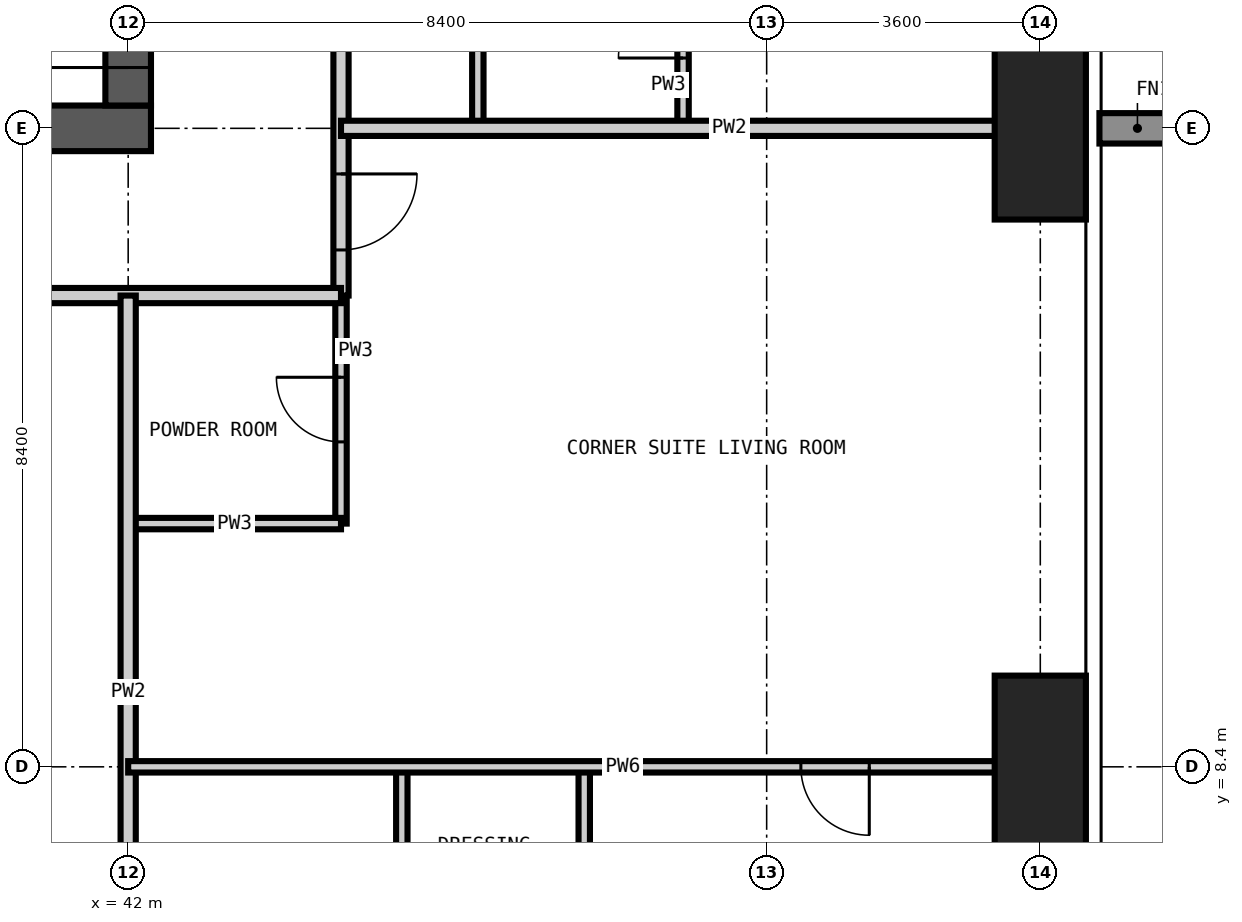
"""IFC4 building model, lengths in metres.
Left out: names, types, materials, properties, quantities, classifications, styles, units other than length and angle.
Written with IfcOpenShell. Run it as: python <this file> out.ifc"""

import sys

from ifc_helpers import new_model, si_unit, direction, frame, frame_2d, origin, origin_2d, place, context, subcontext, project, spatial, rectangle, extrude, element, fill, save


model = new_model("IFC4")
c1 = context("Model", 3, precision=1e-05, world=origin(), true_north=direction((0.0, 1.0)))
c2 = subcontext(c1, "Body", "Model", "MODEL_VIEW")
j1 = project(units=[si_unit("LENGTHUNIT", "METRE"), si_unit("PLANEANGLEUNIT", "RADIAN")], contexts=[c1])
p1 = place(None, origin())
s1 = spatial("IfcSite", under=j1, at=p1, CompositionType="ELEMENT")
p2 = place(p1, origin())
s2 = spatial("IfcBuilding", under=s1, at=p2, CompositionType="ELEMENT")
p3 = place(p2, frame((0.0, 0.0, 205.8)))
s3 = spatial("IfcBuildingStorey", under=s2, at=p3, CompositionType="ELEMENT", Elevation=205.8)
for number, where, z_axis, x_axis in (
    (1, (54.0, 8.4, -0.35), (0.0, 0.0, 1.0), (1.0, 0.0, 0.0)),
    (2, (54.0, 16.8, -0.35), (0.0, 0.0, 1.0), (1.0, 0.0, 0.0)),
):
    element("IfcColumn", number, at=place(p3, frame(where, z_axis=z_axis, x_axis=x_axis)), inside=s3, PredefinedType="COLUMN", context=c2, shape_type="SweptSolid", body=[
        extrude(rectangle(XDim=1.2, YDim=2.4, at=origin_2d()), origin(), (0.0, 0.0, 1.0), 3.6),
    ])
p4 = place(p3, frame((16.5, 16.8, -0.35), z_axis=(0.0, 0.0, 1.0), x_axis=(1.0, 0.0, 0.0)))
e3 = element("IfcWall", 3, at=p4, inside=s3, PredefinedType="SHEAR", context=c2, shape_type="SweptSolid", body=[
    extrude(rectangle(XDim=25.8, YDim=0.6, at=frame_2d((12.9, 0.0))), origin(), (0.0, 0.0, 1.0), 3.6),
])
p5 = place(p4, frame((12.4, 0.0, 0.35)))
e4 = element("IfcOpeningElement", 4, at=p5, cuts=e3, PredefinedType="OPENING", context=c2, shape_type="SweptSolid", body=[
    extrude(rectangle(XDim=1.0, YDim=2.1, at=frame_2d((0.5, 1.05))), frame((0.0, 0.31, 0.0), z_axis=(0.0, -1.0, 0.0), x_axis=(1.0, 0.0, 0.0)), (0.0, 0.0, 1.0), 0.62),
])
p6 = place(p4, frame((18.7, 0.0, 0.35)))
e5 = element("IfcOpeningElement", 5, at=p6, cuts=e3, PredefinedType="OPENING", context=c2, shape_type="SweptSolid", body=[
    extrude(rectangle(XDim=1.0, YDim=2.1, at=frame_2d((0.5, 1.05))), frame((0.0, 0.31, 0.0), z_axis=(0.0, -1.0, 0.0), x_axis=(1.0, 0.0, 0.0)), (0.0, 0.0, 1.0), 0.62),
])
p7 = place(p3, frame((42.0, 17.1, -0.35), z_axis=(0.0, 0.0, 1.0), x_axis=(0.0, 1.0, 0.0)))
e6 = element("IfcWall", 6, at=p7, inside=s3, PredefinedType="SHEAR", context=c2, shape_type="SweptSolid", body=[
    extrude(rectangle(XDim=24.6, YDim=0.6, at=frame_2d((12.3, 0.0))), origin(), (0.0, 0.0, 1.0), 3.6),
])
p8 = place(p7, frame((0.5, 0.0, 0.35)))
e7 = element("IfcOpeningElement", 7, at=p8, cuts=e6, PredefinedType="OPENING", context=c2, shape_type="SweptSolid", body=[
    extrude(rectangle(XDim=1.2, YDim=2.2, at=frame_2d((0.6, 1.1))), frame((0.0, 0.31, 0.0), z_axis=(0.0, -1.0, 0.0), x_axis=(1.0, 0.0, 0.0)), (0.0, 0.0, 1.0), 0.62),
])
p9 = place(p7, frame((11.8, 0.0, 0.35)))
e8 = element("IfcOpeningElement", 8, at=p9, cuts=e6, PredefinedType="OPENING", context=c2, shape_type="SweptSolid", body=[
    extrude(rectangle(XDim=1.0, YDim=2.1, at=frame_2d((0.5, 1.05))), frame((0.0, 0.31, 0.0), z_axis=(0.0, -1.0, 0.0), x_axis=(1.0, 0.0, 0.0)), (0.0, 0.0, 1.0), 0.62),
])
p10 = place(p7, frame((20.2, 0.0, 0.35)))
e9 = element("IfcOpeningElement", 9, at=p10, cuts=e6, PredefinedType="OPENING", context=c2, shape_type="SweptSolid", body=[
    extrude(rectangle(XDim=1.0, YDim=2.1, at=frame_2d((0.5, 1.05))), frame((0.0, 0.31, 0.0), z_axis=(0.0, -1.0, 0.0), x_axis=(1.0, 0.0, 0.0)), (0.0, 0.0, 1.0), 0.62),
])
p11 = place(p3, frame((44.8, 11.6, 0.0), z_axis=(0.0, 0.0, 1.0), x_axis=(0.0, 1.0, 0.0)))
e10 = element("IfcWall", 10, at=p11, inside=s3, PredefinedType="PARTITIONING", context=c2, shape_type="SweptSolid", body=[
    extrude(rectangle(XDim=3.0, YDim=0.15, at=frame_2d((1.5, 0.0))), origin(), (0.0, 0.0, 1.0), 3.25),
])
p12 = place(p11, frame((1.075, 0.0, 0.0)))
e11 = element("IfcOpeningElement", 11, at=p12, cuts=e10, PredefinedType="OPENING", context=c2, shape_type="SweptSolid", body=[
    extrude(rectangle(XDim=0.85, YDim=2.1, at=frame_2d((0.425, 1.05))), frame((0.0, 0.085, 0.0), z_axis=(0.0, -1.0, 0.0), x_axis=(1.0, 0.0, 0.0)), (0.0, 0.0, 1.0), 0.17),
])
p13 = place(p3, frame((46.6, 16.8, 0.0), z_axis=(0.0, 0.0, 1.0), x_axis=(0.0, 1.0, 0.0)))
e12 = element("IfcWall", 12, at=p13, inside=s3, PredefinedType="PARTITIONING", context=c2, shape_type="SweptSolid", body=[
    extrude(rectangle(XDim=2.7, YDim=0.15, at=frame_2d((1.35, 0.0))), origin(), (0.0, 0.0, 1.0), 3.25),
])
p14 = place(p3, frame((49.3, 16.8, 0.0), z_axis=(0.0, 0.0, 1.0), x_axis=(0.0, 1.0, 0.0)))
e13 = element("IfcWall", 13, at=p14, inside=s3, PredefinedType="PARTITIONING", context=c2, shape_type="SweptSolid", body=[
    extrude(rectangle(XDim=2.7, YDim=0.15, at=frame_2d((1.35, 0.0))), origin(), (0.0, 0.0, 1.0), 3.25),
])
p15 = place(p14, frame((0.925, 0.0, 0.0)))
e14 = element("IfcOpeningElement", 14, at=p15, cuts=e13, PredefinedType="OPENING", context=c2, shape_type="SweptSolid", body=[
    extrude(rectangle(XDim=0.85, YDim=2.1, at=frame_2d((0.425, 1.05))), frame((0.0, 0.085, 0.0), z_axis=(0.0, -1.0, 0.0), x_axis=(1.0, 0.0, 0.0)), (0.0, 0.0, 1.0), 0.17),
])
p16 = place(p3, frame((42.0, 11.6, 0.0), z_axis=(0.0, 0.0, 1.0), x_axis=(1.0, 0.0, 0.0)))
e15 = element("IfcWall", 15, at=p16, inside=s3, PredefinedType="PARTITIONING", context=c2, shape_type="SweptSolid", body=[
    extrude(rectangle(XDim=2.8, YDim=0.15, at=frame_2d((1.4, 0.0))), origin(), (0.0, 0.0, 1.0), 3.25),
])
p17 = place(p3, frame((44.8, 45.4, 0.0), z_axis=(0.0, 0.0, 1.0), x_axis=(0.0, -1.0, 0.0)))
e16 = element("IfcWall", 16, at=p17, inside=s3, PredefinedType="PARTITIONING", context=c2, shape_type="SweptSolid", body=[
    extrude(rectangle(XDim=30.8, YDim=0.2, at=frame_2d((15.4, 0.0))), origin(), (0.0, 0.0, 1.0), 3.25),
])
p18 = place(p17, frame((26.0, 0.0, 0.0)))
e17 = element("IfcOpeningElement", 17, at=p18, cuts=e16, PredefinedType="OPENING", context=c2, shape_type="SweptSolid", body=[
    extrude(rectangle(XDim=1.0, YDim=2.2, at=frame_2d((0.5, 1.1))), frame((0.0, 0.11, 0.0), z_axis=(0.0, -1.0, 0.0), x_axis=(1.0, 0.0, 0.0)), (0.0, 0.0, 1.0), 0.22),
])
p19 = place(p17, frame((21.8, 0.0, 0.0)))
e18 = element("IfcOpeningElement", 18, at=p19, cuts=e16, PredefinedType="OPENING", context=c2, shape_type="SweptSolid", body=[
    extrude(rectangle(XDim=1.0, YDim=2.2, at=frame_2d((0.5, 1.1))), frame((0.0, 0.11, 0.0), z_axis=(0.0, -1.0, 0.0), x_axis=(1.0, 0.0, 0.0)), (0.0, 0.0, 1.0), 0.22),
])
p20 = place(p17, frame((16.7, 0.0, 0.0)))
e19 = element("IfcOpeningElement", 19, at=p20, cuts=e16, PredefinedType="OPENING", context=c2, shape_type="SweptSolid", body=[
    extrude(rectangle(XDim=1.0, YDim=2.2, at=frame_2d((0.5, 1.1))), frame((0.0, 0.11, 0.0), z_axis=(0.0, -1.0, 0.0), x_axis=(1.0, 0.0, 0.0)), (0.0, 0.0, 1.0), 0.22),
])
p21 = place(p17, frame((5.0, 0.0, 0.0)))
e20 = element("IfcOpeningElement", 20, at=p21, cuts=e16, PredefinedType="OPENING", context=c2, shape_type="SweptSolid", body=[
    extrude(rectangle(XDim=1.0, YDim=2.2, at=frame_2d((0.5, 1.1))), frame((0.0, 0.11, 0.0), z_axis=(0.0, -1.0, 0.0), x_axis=(1.0, 0.0, 0.0)), (0.0, 0.0, 1.0), 0.22),
])
p22 = place(p17, frame((29.2, 0.0, 0.0)))
e21 = element("IfcOpeningElement", 21, at=p22, cuts=e16, PredefinedType="OPENING", context=c2, shape_type="SweptSolid", body=[
    extrude(rectangle(XDim=1.0, YDim=2.2, at=frame_2d((0.5, 1.1))), frame((0.0, 0.11, 0.0), z_axis=(0.0, -1.0, 0.0), x_axis=(1.0, 0.0, 0.0)), (0.0, 0.0, 1.0), 0.22),
])
p23 = place(p17, frame((1.2, 0.0, 0.0)))
e22 = element("IfcOpeningElement", 22, at=p23, cuts=e16, PredefinedType="OPENING", context=c2, shape_type="SweptSolid", body=[
    extrude(rectangle(XDim=1.0, YDim=2.2, at=frame_2d((0.5, 1.1))), frame((0.0, 0.11, 0.0), z_axis=(0.0, -1.0, 0.0), x_axis=(1.0, 0.0, 0.0)), (0.0, 0.0, 1.0), 0.22),
])
p24 = place(p3, frame((44.8, 14.6, 0.0), z_axis=(0.0, 0.0, 1.0), x_axis=(-1.0, 0.0, 0.0)))
e23 = element("IfcWall", 23, at=p24, inside=s3, PredefinedType="PARTITIONING", context=c2, shape_type="SweptSolid", body=[
    extrude(rectangle(XDim=30.2, YDim=0.2, at=frame_2d((15.1, 0.0))), origin(), (0.0, 0.0, 1.0), 3.25),
])
p25 = place(p24, frame((24.5, 0.0, 0.0)))
e24 = element("IfcOpeningElement", 24, at=p25, cuts=e23, PredefinedType="OPENING", context=c2, shape_type="SweptSolid", body=[
    extrude(rectangle(XDim=1.0, YDim=2.2, at=frame_2d((0.5, 1.1))), frame((0.0, 0.11, 0.0), z_axis=(0.0, -1.0, 0.0), x_axis=(1.0, 0.0, 0.0)), (0.0, 0.0, 1.0), 0.22),
])
p26 = place(p24, frame((12.8, 0.0, 0.0)))
e25 = element("IfcOpeningElement", 25, at=p26, cuts=e23, PredefinedType="OPENING", context=c2, shape_type="SweptSolid", body=[
    extrude(rectangle(XDim=1.0, YDim=2.2, at=frame_2d((0.5, 1.1))), frame((0.0, 0.11, 0.0), z_axis=(0.0, -1.0, 0.0), x_axis=(1.0, 0.0, 0.0)), (0.0, 0.0, 1.0), 0.22),
])
p27 = place(p24, frame((6.5, 0.0, 0.0)))
e26 = element("IfcOpeningElement", 26, at=p27, cuts=e23, PredefinedType="OPENING", context=c2, shape_type="SweptSolid", body=[
    extrude(rectangle(XDim=1.0, YDim=2.2, at=frame_2d((0.5, 1.1))), frame((0.0, 0.11, 0.0), z_axis=(0.0, -1.0, 0.0), x_axis=(1.0, 0.0, 0.0)), (0.0, 0.0, 1.0), 0.22),
])
p28 = place(p3, frame((42.0, 4.182, 0.0), z_axis=(0.0, 0.0, 1.0), x_axis=(0.0, 1.0, 0.0)))
e27 = element("IfcWall", 27, at=p28, inside=s3, PredefinedType="PARTITIONING", context=c2, shape_type="SweptSolid", body=[
    extrude(rectangle(XDim=10.418, YDim=0.2, at=frame_2d((5.209, 0.0))), origin(), (0.0, 0.0, 1.0), 3.25),
])
p29 = place(p3, frame((44.8, 16.8, 0.0), z_axis=(0.0, 0.0, 1.0), x_axis=(1.0, 0.0, 0.0)))
e28 = element("IfcWall", 28, at=p29, inside=s3, PredefinedType="PARTITIONING", context=c2, shape_type="SweptSolid", body=[
    extrude(rectangle(XDim=9.818, YDim=0.2, at=frame_2d((4.909, 0.0))), origin(), (0.0, 0.0, 1.0), 3.25),
])
p30 = place(p3, frame((45.6, 5.4, 0.0), z_axis=(0.0, 0.0, 1.0), x_axis=(0.0, 1.0, 0.0)))
e29 = element("IfcWall", 29, at=p30, inside=s3, PredefinedType="PARTITIONING", context=c2, shape_type="SweptSolid", body=[
    extrude(rectangle(XDim=3.0, YDim=0.15, at=frame_2d((1.5, 0.0))), origin(), (0.0, 0.0, 1.0), 3.25),
])
p31 = place(p3, frame((48.0, 5.4, 0.0), z_axis=(0.0, 0.0, 1.0), x_axis=(0.0, 1.0, 0.0)))
e30 = element("IfcWall", 30, at=p31, inside=s3, PredefinedType="PARTITIONING", context=c2, shape_type="SweptSolid", body=[
    extrude(rectangle(XDim=3.0, YDim=0.15, at=frame_2d((1.5, 0.0))), origin(), (0.0, 0.0, 1.0), 3.25),
])
p32 = place(p31, frame((1.05, 0.0, 0.0)))
e31 = element("IfcOpeningElement", 31, at=p32, cuts=e30, PredefinedType="OPENING", context=c2, shape_type="SweptSolid", body=[
    extrude(rectangle(XDim=0.9, YDim=2.1, at=frame_2d((0.45, 1.05))), frame((0.0, 0.085, 0.0), z_axis=(0.0, -1.0, 0.0), x_axis=(1.0, 0.0, 0.0)), (0.0, 0.0, 1.0), 0.17),
])
p33 = place(p3, frame((42.0, 8.4, 0.0), z_axis=(0.0, 0.0, 1.0), x_axis=(1.0, 0.0, 0.0)))
e32 = element("IfcWall", 32, at=p33, inside=s3, PredefinedType="PARTITIONING", context=c2, shape_type="SweptSolid", body=[
    extrude(rectangle(XDim=12.618, YDim=0.15, at=frame_2d((6.309, 0.0))), origin(), (0.0, 0.0, 1.0), 3.25),
])
p34 = place(p33, frame((8.85, 0.0, 0.0)))
e33 = element("IfcOpeningElement", 33, at=p34, cuts=e32, PredefinedType="OPENING", context=c2, shape_type="SweptSolid", body=[
    extrude(rectangle(XDim=0.9, YDim=2.1, at=frame_2d((0.45, 1.05))), frame((0.0, 0.085, 0.0), z_axis=(0.0, -1.0, 0.0), x_axis=(1.0, 0.0, 0.0)), (0.0, 0.0, 1.0), 0.17),
])
p35 = place(p8, origin())
e34 = element("IfcDoor", 34, at=p35, inside=s3, OperationType="SINGLE_SWING_LEFT", PredefinedType="DOOR", context=c2, shape_type="SweptSolid", body=[
    extrude(rectangle(XDim=1.2, YDim=2.2, at=frame_2d((0.6, 1.1))), frame((0.0, 0.025, 0.0), z_axis=(0.0, -1.0, 0.0), x_axis=(1.0, 0.0, 0.0)), (0.0, 0.0, 1.0), 0.05),
])
fill(e7, e34)
p36 = place(p15, origin())
e35 = element("IfcDoor", 35, at=p36, inside=s3, OperationType="SINGLE_SWING_LEFT", PredefinedType="DOOR", context=c2, shape_type="SweptSolid", body=[
    extrude(rectangle(XDim=0.85, YDim=2.1, at=frame_2d((0.425, 1.05))), frame((0.0, 0.025, 0.0), z_axis=(0.0, -1.0, 0.0), x_axis=(1.0, 0.0, 0.0)), (0.0, 0.0, 1.0), 0.05),
])
fill(e14, e35)
p37 = place(p22, origin())
e36 = element("IfcDoor", 36, at=p37, inside=s3, OperationType="SINGLE_SWING_LEFT", PredefinedType="DOOR", context=c2, shape_type="SweptSolid", body=[
    extrude(rectangle(XDim=1.0, YDim=2.2, at=frame_2d((0.5, 1.1))), frame((0.0, 0.025, 0.0), z_axis=(0.0, -1.0, 0.0), x_axis=(1.0, 0.0, 0.0)), (0.0, 0.0, 1.0), 0.05),
])
fill(e21, e36)
p38 = place(p12, origin())
e37 = element("IfcDoor", 37, at=p38, inside=s3, OperationType="SINGLE_SWING_RIGHT", PredefinedType="DOOR", context=c2, shape_type="SweptSolid", body=[
    extrude(rectangle(XDim=0.85, YDim=2.1, at=frame_2d((0.425, 1.05))), frame((0.0, 0.025, 0.0), z_axis=(0.0, -1.0, 0.0), x_axis=(1.0, 0.0, 0.0)), (0.0, 0.0, 1.0), 0.05),
])
fill(e11, e37)
p39 = place(p34, frame((0.9, 0.0, 0.0), z_axis=(0.0, 0.0, 1.0), x_axis=(-1.0, 0.0, 0.0)))
e38 = element("IfcDoor", 38, at=p39, inside=s3, OperationType="SINGLE_SWING_LEFT", PredefinedType="DOOR", context=c2, shape_type="SweptSolid", body=[
    extrude(rectangle(XDim=0.9, YDim=2.1, at=frame_2d((0.45, 1.05))), frame((0.0, 0.025, 0.0), z_axis=(0.0, -1.0, 0.0), x_axis=(1.0, 0.0, 0.0)), (0.0, 0.0, 1.0), 0.05),
])
fill(e33, e38)
save(model, sys.argv[1])
